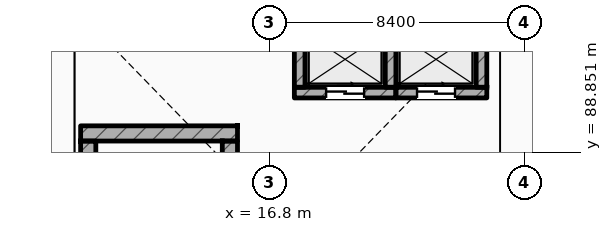
"""IFC4 building model, lengths in metres.
Left out: names, types, materials, properties, quantities, classifications, styles, units other than length and angle.
Written with IfcOpenShell. Run it as: python <this file> out.ifc"""

import sys

from ifc_helpers import new_model, si_unit, direction, frame, frame_2d, origin, place, context, subcontext, project, spatial, rectangle, extrude, element, fill, save


model = new_model("IFC4")
c1 = context("Model", 3, precision=1e-05, world=origin(), true_north=direction((0.0, 1.0)))
c2 = subcontext(c1, "Body", "Model", "MODEL_VIEW")
j1 = project(units=[si_unit("LENGTHUNIT", "METRE"), si_unit("PLANEANGLEUNIT", "RADIAN")], contexts=[c1])
p1 = place(None, origin())
s1 = spatial("IfcSite", under=j1, at=p1, CompositionType="ELEMENT")
p2 = place(p1, origin())
s2 = spatial("IfcBuilding", under=s1, at=p2, CompositionType="ELEMENT")
p3 = place(p2, frame((0.0, 0.0, -4.5)))
s3 = spatial("IfcBuildingStorey", under=s2, at=p3, CompositionType="ELEMENT", Elevation=-4.5)
p4 = place(p3, frame((10.6, 89.462, 0.0), z_axis=(0.0, 0.0, 1.0), x_axis=(1.0, 0.0, 0.0)))
e1 = element("IfcWall", 1, at=p4, inside=s3, PredefinedType="SHEAR", context=c2, shape_type="SweptSolid", body=[
    extrude(rectangle(XDim=5.16, YDim=0.5, at=frame_2d((2.58, 0.0))), origin(), (0.0, 0.0, 1.0), 4.5),
])
p5 = place(p3, frame((10.85, 80.1, 0.0), z_axis=(0.0, 0.0, 1.0), x_axis=(0.0, 1.0, 0.0)))
e2 = element("IfcWall", 2, at=p5, inside=s3, PredefinedType="SHEAR", context=c2, shape_type="SweptSolid", body=[
    extrude(rectangle(XDim=9.112, YDim=0.5, at=frame_2d((4.556, 0.0))), origin(), (0.0, 0.0, 1.0), 4.5),
])
p6 = place(p3, frame((15.51, 80.1, 0.0), z_axis=(0.0, 0.0, 1.0), x_axis=(0.0, 1.0, 0.0)))
e3 = element("IfcWall", 3, at=p6, inside=s3, PredefinedType="SHEAR", context=c2, shape_type="SweptSolid", body=[
    extrude(rectangle(XDim=9.112, YDim=0.5, at=frame_2d((4.556, 0.0))), origin(), (0.0, 0.0, 1.0), 4.5),
])
p7 = place(p6, frame((0.44, 0.0, 0.0)))
e4 = element("IfcOpeningElement", 4, at=p7, cuts=e3, PredefinedType="OPENING", context=c2, shape_type="SweptSolid", body=[
    extrude(rectangle(XDim=1.1, YDim=2.2, at=frame_2d((0.55, 1.1))), frame((0.0, 0.26, 0.0), z_axis=(0.0, -1.0, 0.0), x_axis=(1.0, 0.0, 0.0)), (0.0, 0.0, 1.0), 0.52),
])
p8 = place(p3, frame((17.63, 90.805, 0.0), z_axis=(0.0, 0.0, 1.0), x_axis=(1.0, 0.0, 0.0)))
e5 = element("IfcWall", 5, at=p8, inside=s3, PredefinedType="SHEAR", context=c2, shape_type="SweptSolid", body=[
    extrude(rectangle(XDim=3.34, YDim=0.35, at=frame_2d((1.67, 0.0))), origin(), (0.0, 0.0, 1.0), 4.1),
])
p9 = place(p8, frame((1.045, 0.0, 0.0)))
e6 = element("IfcOpeningElement", 6, at=p9, cuts=e5, PredefinedType="OPENING", context=c2, shape_type="SweptSolid", body=[
    extrude(rectangle(XDim=1.25, YDim=2.25, at=frame_2d((0.625, 1.125))), frame((0.0, 0.185, 0.0), z_axis=(0.0, -1.0, 0.0), x_axis=(1.0, 0.0, 0.0)), (0.0, 0.0, 1.0), 0.37),
])
for number, where, z_axis, x_axis in (
    (7, (17.805, 90.98, 0.0), (0.0, 0.0, 1.0), (0.0, 1.0, 0.0)),
    (8, (20.795, 90.98, 0.0), (0.0, 0.0, 1.0), (0.0, 1.0, 0.0)),
):
    element("IfcWall", number, at=place(p3, frame(where, z_axis=z_axis, x_axis=x_axis)), inside=s3, PredefinedType="SHEAR", context=c2, shape_type="SweptSolid", body=[
        extrude(rectangle(XDim=1.84, YDim=0.35, at=frame_2d((0.92, 0.0))), origin(), (0.0, 0.0, 1.0), 4.1),
    ])
p10 = place(p3, frame((20.97, 90.805, 0.0), z_axis=(0.0, 0.0, 1.0), x_axis=(1.0, 0.0, 0.0)))
e9 = element("IfcWall", 9, at=p10, inside=s3, PredefinedType="SHEAR", context=c2, shape_type="SweptSolid", body=[
    extrude(rectangle(XDim=2.99, YDim=0.35, at=frame_2d((1.495, 0.0))), origin(), (0.0, 0.0, 1.0), 4.1),
])
p11 = place(p10, frame((0.695, 0.0, 0.0)))
e10 = element("IfcOpeningElement", 10, at=p11, cuts=e9, PredefinedType="OPENING", context=c2, shape_type="SweptSolid", body=[
    extrude(rectangle(XDim=1.25, YDim=2.25, at=frame_2d((0.625, 1.125))), frame((0.0, 0.185, 0.0), z_axis=(0.0, -1.0, 0.0), x_axis=(1.0, 0.0, 0.0)), (0.0, 0.0, 1.0), 0.37),
])
p12 = place(p3, frame((23.785, 90.98, 0.0), z_axis=(0.0, 0.0, 1.0), x_axis=(0.0, 1.0, 0.0)))
e11 = element("IfcWall", 11, at=p12, inside=s3, PredefinedType="SHEAR", context=c2, shape_type="SweptSolid", body=[
    extrude(rectangle(XDim=1.84, YDim=0.35, at=frame_2d((0.92, 0.0))), origin(), (0.0, 0.0, 1.0), 4.1),
])
p13 = place(p9, origin())
e12 = element("IfcDoor", 12, at=p13, inside=s3, OperationType="SLIDING_TO_LEFT", PredefinedType="DOOR", context=c2, shape_type="SweptSolid", body=[
    extrude(rectangle(XDim=1.25, YDim=2.25, at=frame_2d((0.625, 1.125))), frame((0.0, 0.025, 0.0), z_axis=(0.0, -1.0, 0.0), x_axis=(1.0, 0.0, 0.0)), (0.0, 0.0, 1.0), 0.05),
])
fill(e6, e12)
p14 = place(p11, origin())
e13 = element("IfcDoor", 13, at=p14, inside=s3, OperationType="SLIDING_TO_LEFT", PredefinedType="DOOR", context=c2, shape_type="SweptSolid", body=[
    extrude(rectangle(XDim=1.25, YDim=2.25, at=frame_2d((0.625, 1.125))), frame((0.0, 0.025, 0.0), z_axis=(0.0, -1.0, 0.0), x_axis=(1.0, 0.0, 0.0)), (0.0, 0.0, 1.0), 0.05),
])
fill(e10, e13)
save(model, sys.argv[1])
